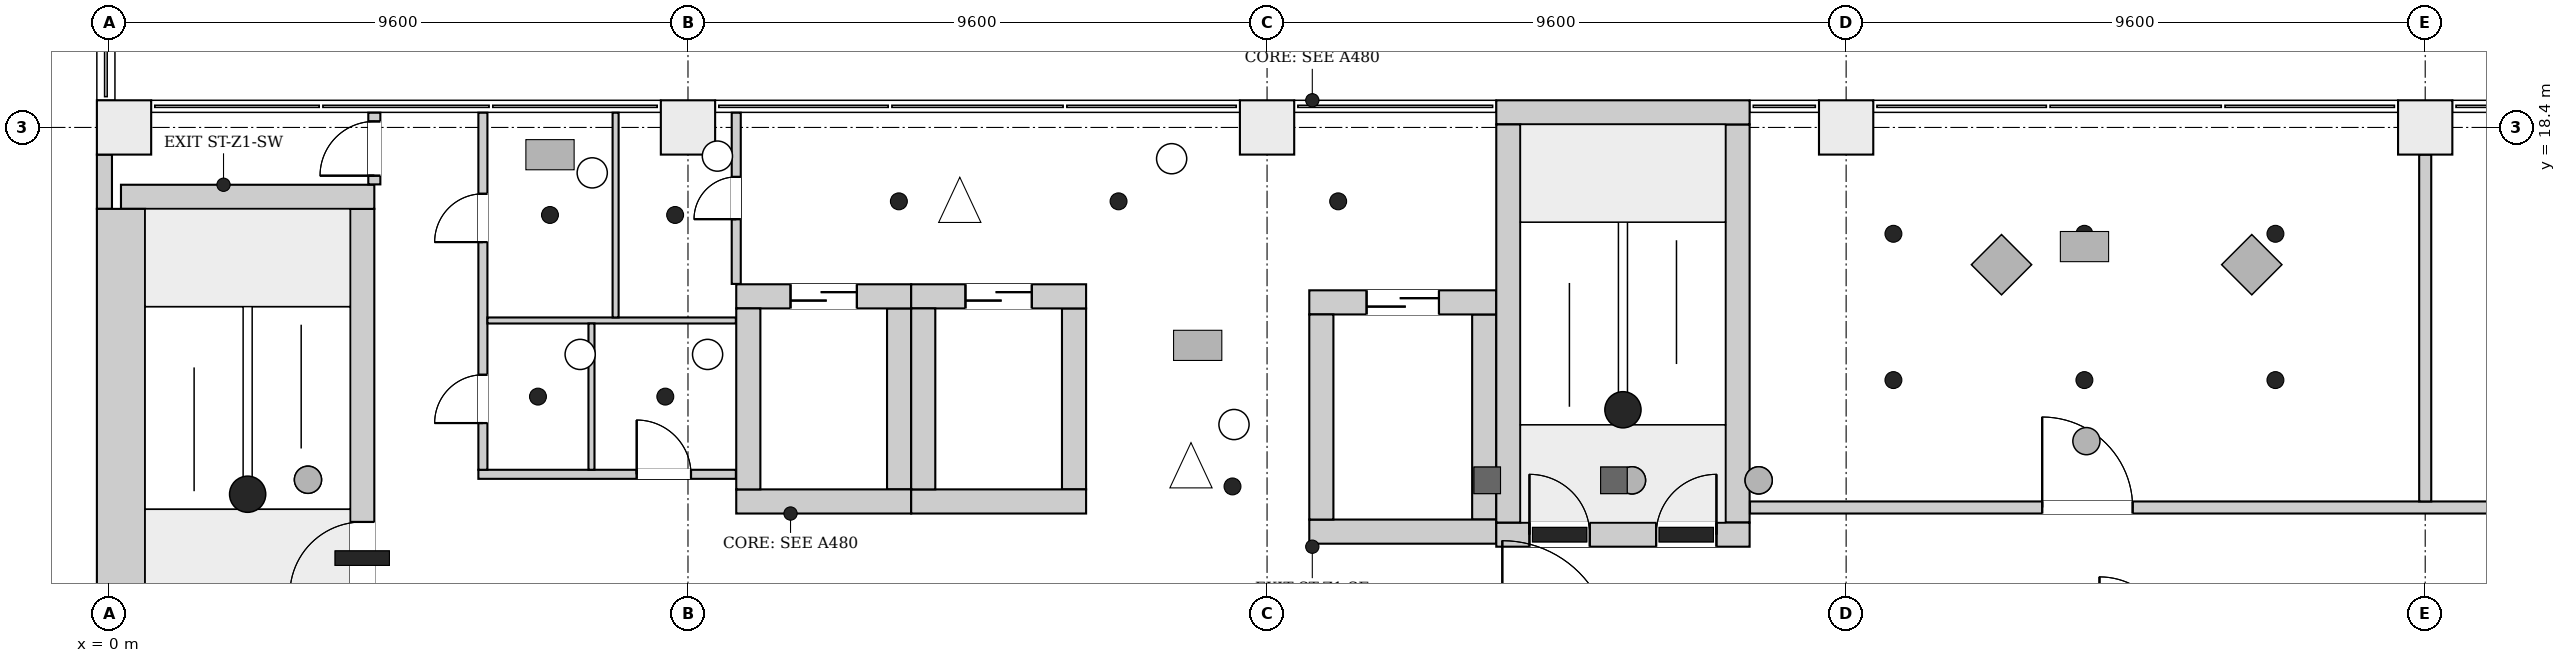
"""IFC4 building model, lengths in metres.
Left out: names, types, materials, properties, quantities, classifications, styles, units other than length and angle.
Written with IfcOpenShell. Run it as: python <this file> out.ifc"""

import sys

from ifc_helpers import new_model, si_unit, direction, frame, frame_2d, origin, origin_2d, place, context, subcontext, project, spatial, rectangle, extrude, element, fill, save


model = new_model("IFC4")
c1 = context("Model", 3, precision=1e-05, world=origin(), true_north=direction((0.0, 1.0)))
c2 = subcontext(c1, "Body", "Model", "MODEL_VIEW")
j1 = project(units=[si_unit("LENGTHUNIT", "METRE"), si_unit("PLANEANGLEUNIT", "RADIAN")], contexts=[c1])
p1 = place(None, origin())
s1 = spatial("IfcSite", under=j1, at=p1, CompositionType="ELEMENT")
p2 = place(p1, origin())
s2 = spatial("IfcBuilding", under=s1, at=p2, CompositionType="ELEMENT")
p3 = place(p2, frame((0.0, 0.0, 61.3)))
s3 = spatial("IfcBuildingStorey", under=s2, at=p3, CompositionType="ELEMENT", Elevation=61.3)
p4 = place(p3, frame((0.2, 17.25, 0.0), z_axis=(0.0, 0.0, 1.0), x_axis=(1.0, 0.0, 0.0)))
e1 = element("IfcWall", 1, at=p4, inside=s3, PredefinedType="SHEAR", context=c2, shape_type="SweptSolid", body=[
    extrude(rectangle(XDim=4.2, YDim=0.4, at=frame_2d((2.1, 0.0))), origin(), (0.0, 0.0, 1.0), 4.2),
])
p5 = place(p3, frame((0.2, 10.45, 0.0), z_axis=(0.0, 0.0, 1.0), x_axis=(0.0, 1.0, 0.0)))
e2 = element("IfcWall", 2, at=p5, inside=s3, PredefinedType="SHEAR", context=c2, shape_type="SweptSolid", body=[
    extrude(rectangle(XDim=6.6, YDim=0.8, at=frame_2d((3.3, 0.0))), origin(), (0.0, 0.0, 1.0), 4.2),
])
p6 = place(p3, frame((4.2, 10.45, 0.0), z_axis=(0.0, 0.0, 1.0), x_axis=(0.0, 1.0, 0.0)))
e3 = element("IfcWall", 3, at=p6, inside=s3, PredefinedType="SHEAR", context=c2, shape_type="SweptSolid", body=[
    extrude(rectangle(XDim=6.6, YDim=0.4, at=frame_2d((3.3, 0.0))), origin(), (0.0, 0.0, 1.0), 4.2),
])
p7 = place(p6, frame((0.21, 0.0, 0.0)))
e4 = element("IfcOpeningElement", 4, at=p7, cuts=e3, PredefinedType="OPENING", context=c2, shape_type="SweptSolid", body=[
    extrude(rectangle(XDim=1.2, YDim=2.1, at=frame_2d((0.6, 1.05))), frame((0.0, 0.21, 0.0), z_axis=(0.0, -1.0, 0.0), x_axis=(1.0, 0.0, 0.0)), (0.0, 0.0, 1.0), 0.42),
])
p8 = place(p3, frame((23.0, 11.65, 0.0), z_axis=(0.0, 0.0, 1.0), x_axis=(1.0, 0.0, 0.0)))
e5 = element("IfcWall", 5, at=p8, inside=s3, PredefinedType="SHEAR", context=c2, shape_type="SweptSolid", body=[
    extrude(rectangle(XDim=4.2, YDim=0.4, at=frame_2d((2.1, 0.0))), origin(), (0.0, 0.0, 1.0), 4.2),
])
p9 = place(p8, frame((0.55, 0.0, 0.0)))
e6 = element("IfcOpeningElement", 6, at=p9, cuts=e5, PredefinedType="OPENING", context=c2, shape_type="SweptSolid", body=[
    extrude(rectangle(XDim=1.0, YDim=2.1, at=frame_2d((0.5, 1.05))), frame((0.0, 0.21, 0.0), z_axis=(0.0, -1.0, 0.0), x_axis=(1.0, 0.0, 0.0)), (0.0, 0.0, 1.0), 0.42),
])
p10 = place(p8, frame((2.65, 0.0, 0.0)))
e7 = element("IfcOpeningElement", 7, at=p10, cuts=e5, PredefinedType="OPENING", context=c2, shape_type="SweptSolid", body=[
    extrude(rectangle(XDim=1.0, YDim=2.1, at=frame_2d((0.5, 1.05))), frame((0.0, 0.21, 0.0), z_axis=(0.0, -1.0, 0.0), x_axis=(1.0, 0.0, 0.0)), (0.0, 0.0, 1.0), 0.42),
])
p11 = place(p3, frame((23.0, 18.65, 0.0), z_axis=(0.0, 0.0, 1.0), x_axis=(1.0, 0.0, 0.0)))
e8 = element("IfcWall", 8, at=p11, inside=s3, PredefinedType="SHEAR", context=c2, shape_type="SweptSolid", body=[
    extrude(rectangle(XDim=4.2, YDim=0.4, at=frame_2d((2.1, 0.0))), origin(), (0.0, 0.0, 1.0), 4.2),
])
for number, where, z_axis, x_axis in (
    (9, (23.2, 11.85, 0.0), (0.0, 0.0, 1.0), (0.0, 1.0, 0.0)),
    (10, (27.0, 11.85, 0.0), (0.0, 0.0, 1.0), (0.0, 1.0, 0.0)),
):
    element("IfcWall", number, at=place(p3, frame(where, z_axis=z_axis, x_axis=x_axis)), inside=s3, PredefinedType="SHEAR", context=c2, shape_type="SweptSolid", body=[
        extrude(rectangle(XDim=6.6, YDim=0.4, at=frame_2d((3.3, 0.0))), origin(), (0.0, 0.0, 1.0), 4.2),
    ])
p12 = place(p3, frame((10.4, 12.2, 0.0), z_axis=(0.0, 0.0, 1.0), x_axis=(1.0, 0.0, 0.0)))
e11 = element("IfcWall", 11, at=p12, inside=s3, PredefinedType="SHEAR", context=c2, shape_type="SweptSolid", body=[
    extrude(rectangle(XDim=2.9, YDim=0.4, at=frame_2d((1.45, 0.0))), origin(), (0.0, 0.0, 1.0), 4.2),
])
p13 = place(p3, frame((10.4, 15.6, 0.0), z_axis=(0.0, 0.0, 1.0), x_axis=(1.0, 0.0, 0.0)))
e12 = element("IfcWall", 12, at=p13, inside=s3, PredefinedType="SHEAR", context=c2, shape_type="SweptSolid", body=[
    extrude(rectangle(XDim=2.9, YDim=0.4, at=frame_2d((1.45, 0.0))), origin(), (0.0, 0.0, 1.0), 4.2),
])
p14 = place(p13, frame((0.9, 0.0, 0.0)))
e13 = element("IfcOpeningElement", 13, at=p14, cuts=e12, PredefinedType="OPENING", context=c2, shape_type="SweptSolid", body=[
    extrude(rectangle(XDim=1.1, YDim=2.1, at=frame_2d((0.55, 1.05))), frame((0.0, 0.21, 0.0), z_axis=(0.0, -1.0, 0.0), x_axis=(1.0, 0.0, 0.0)), (0.0, 0.0, 1.0), 0.42),
])
for number, where, z_axis, x_axis in (
    (14, (10.6, 12.4, 0.0), (0.0, 0.0, 1.0), (0.0, 1.0, 0.0)),
    (15, (13.1, 12.4, 0.0), (0.0, 0.0, 1.0), (0.0, 1.0, 0.0)),
):
    element("IfcWall", number, at=place(p3, frame(where, z_axis=z_axis, x_axis=x_axis)), inside=s3, PredefinedType="SHEAR", context=c2, shape_type="SweptSolid", body=[
        extrude(rectangle(XDim=3.0, YDim=0.4, at=frame_2d((1.5, 0.0))), origin(), (0.0, 0.0, 1.0), 4.2),
    ])
p15 = place(p3, frame((13.3, 12.2, 0.0), z_axis=(0.0, 0.0, 1.0), x_axis=(1.0, 0.0, 0.0)))
e16 = element("IfcWall", 16, at=p15, inside=s3, PredefinedType="SHEAR", context=c2, shape_type="SweptSolid", body=[
    extrude(rectangle(XDim=2.9, YDim=0.4, at=frame_2d((1.45, 0.0))), origin(), (0.0, 0.0, 1.0), 4.2),
])
p16 = place(p3, frame((13.3, 15.6, 0.0), z_axis=(0.0, 0.0, 1.0), x_axis=(1.0, 0.0, 0.0)))
e17 = element("IfcWall", 17, at=p16, inside=s3, PredefinedType="SHEAR", context=c2, shape_type="SweptSolid", body=[
    extrude(rectangle(XDim=2.9, YDim=0.4, at=frame_2d((1.45, 0.0))), origin(), (0.0, 0.0, 1.0), 4.2),
])
p17 = place(p16, frame((0.9, 0.0, 0.0)))
e18 = element("IfcOpeningElement", 18, at=p17, cuts=e17, PredefinedType="OPENING", context=c2, shape_type="SweptSolid", body=[
    extrude(rectangle(XDim=1.1, YDim=2.1, at=frame_2d((0.55, 1.05))), frame((0.0, 0.21, 0.0), z_axis=(0.0, -1.0, 0.0), x_axis=(1.0, 0.0, 0.0)), (0.0, 0.0, 1.0), 0.42),
])
for number, where, z_axis, x_axis in (
    (19, (13.5, 12.4, 0.0), (0.0, 0.0, 1.0), (0.0, 1.0, 0.0)),
    (20, (16.0, 12.4, 0.0), (0.0, 0.0, 1.0), (0.0, 1.0, 0.0)),
):
    element("IfcWall", number, at=place(p3, frame(where, z_axis=z_axis, x_axis=x_axis)), inside=s3, PredefinedType="SHEAR", context=c2, shape_type="SweptSolid", body=[
        extrude(rectangle(XDim=3.0, YDim=0.4, at=frame_2d((1.5, 0.0))), origin(), (0.0, 0.0, 1.0), 4.2),
    ])
p18 = place(p3, frame((19.9, 11.7, 0.0), z_axis=(0.0, 0.0, 1.0), x_axis=(1.0, 0.0, 0.0)))
e21 = element("IfcWall", 21, at=p18, inside=s3, PredefinedType="SHEAR", context=c2, shape_type="SweptSolid", body=[
    extrude(rectangle(XDim=3.1, YDim=0.4, at=frame_2d((1.55, 0.0))), origin(), (0.0, 0.0, 1.0), 4.2),
])
p19 = place(p3, frame((19.9, 15.5, 0.0), z_axis=(0.0, 0.0, 1.0), x_axis=(1.0, 0.0, 0.0)))
e22 = element("IfcWall", 22, at=p19, inside=s3, PredefinedType="SHEAR", context=c2, shape_type="SweptSolid", body=[
    extrude(rectangle(XDim=3.1, YDim=0.4, at=frame_2d((1.55, 0.0))), origin(), (0.0, 0.0, 1.0), 4.2),
])
p20 = place(p19, frame((0.95, 0.0, 0.0)))
e23 = element("IfcOpeningElement", 23, at=p20, cuts=e22, PredefinedType="OPENING", context=c2, shape_type="SweptSolid", body=[
    extrude(rectangle(XDim=1.2, YDim=2.1, at=frame_2d((0.6, 1.05))), frame((0.0, 0.21, 0.0), z_axis=(0.0, -1.0, 0.0), x_axis=(1.0, 0.0, 0.0)), (0.0, 0.0, 1.0), 0.42),
])
for number, where, z_axis, x_axis in (
    (24, (20.1, 11.9, 0.0), (0.0, 0.0, 1.0), (0.0, 1.0, 0.0)),
    (25, (22.8, 11.9, 0.0), (0.0, 0.0, 1.0), (0.0, 1.0, 0.0)),
):
    element("IfcWall", number, at=place(p3, frame(where, z_axis=z_axis, x_axis=x_axis)), inside=s3, PredefinedType="SHEAR", context=c2, shape_type="SweptSolid", body=[
        extrude(rectangle(XDim=3.4, YDim=0.4, at=frame_2d((1.7, 0.0))), origin(), (0.0, 0.0, 1.0), 4.2),
    ])
for number, where, z_axis, x_axis in (
    (26, (0.25, 18.4, 0.0), (0.0, 0.0, 1.0), (1.0, 0.0, 0.0)),
    (27, (9.6, 18.4, 0.0), (0.0, 0.0, 1.0), (1.0, 0.0, 0.0)),
    (28, (19.2, 18.4, 0.0), (0.0, 0.0, 1.0), (1.0, 0.0, 0.0)),
    (29, (28.8, 18.4, 0.0), (0.0, 0.0, 1.0), (1.0, 0.0, 0.0)),
    (30, (38.4, 18.4, 0.0), (0.0, 0.0, 1.0), (1.0, 0.0, 0.0)),
):
    element("IfcColumn", number, at=place(p3, frame(where, z_axis=z_axis, x_axis=x_axis)), inside=s3, PredefinedType="COLUMN", context=c2, shape_type="SweptSolid", body=[
        extrude(rectangle(XDim=0.9, YDim=0.9, at=origin_2d()), origin(), (0.0, 0.0, 1.0), 4.2),
    ])
p21 = place(p3, frame((-0.074, 17.95, 0.0), z_axis=(0.0, 0.0, 1.0), x_axis=(0.0, -1.0, 0.0)))
e31 = element("IfcWall", 31, at=p21, inside=s3, PredefinedType="ELEMENTEDWALL", context=c2, shape_type="SweptSolid", body=[
    extrude(rectangle(XDim=0.9, YDim=0.25, at=frame_2d((0.45, 0.0))), origin(), (0.0, 0.0, 1.0), 3.9),
])
p22 = place(p3, frame((4.4, 17.456, 0.0), z_axis=(0.0, 0.0, 1.0), x_axis=(0.0, 1.0, 0.0)))
e32 = element("IfcWall", 32, at=p22, inside=s3, PredefinedType="PARTITIONING", context=c2, shape_type="SweptSolid", body=[
    extrude(rectangle(XDim=1.188, YDim=0.2, at=frame_2d((0.594, 0.0))), origin(), (0.0, 0.0, 1.0), 3.9),
])
p23 = place(p22, frame((0.144, 0.0, 0.0)))
e33 = element("IfcOpeningElement", 33, at=p23, cuts=e32, PredefinedType="OPENING", context=c2, shape_type="SweptSolid", body=[
    extrude(rectangle(XDim=0.9, YDim=2.1, at=frame_2d((0.45, 1.05))), frame((0.0, 0.11, 0.0), z_axis=(0.0, -1.0, 0.0), x_axis=(1.0, 0.0, 0.0)), (0.0, 0.0, 1.0), 0.22),
])
p24 = place(p3, frame((6.125, 12.65, 0.0), z_axis=(0.0, 0.0, 1.0), x_axis=(1.0, 0.0, 0.0)))
e34 = element("IfcWall", 34, at=p24, inside=s3, PredefinedType="PARTITIONING", context=c2, shape_type="SweptSolid", body=[
    extrude(rectangle(XDim=4.269, YDim=0.15, at=frame_2d((2.135, 0.0))), origin(), (0.0, 0.0, 1.0), 3.9),
])
p25 = place(p24, frame((2.625, 0.0, 0.0)))
e35 = element("IfcOpeningElement", 35, at=p25, cuts=e34, PredefinedType="OPENING", context=c2, shape_type="SweptSolid", body=[
    extrude(rectangle(XDim=0.9, YDim=2.1, at=frame_2d((0.45, 1.05))), frame((0.0, 0.085, 0.0), z_axis=(0.0, -1.0, 0.0), x_axis=(1.0, 0.0, 0.0)), (0.0, 0.0, 1.0), 0.17),
])
p26 = place(p3, frame((6.2, 12.725, 0.0), z_axis=(0.0, 0.0, 1.0), x_axis=(0.0, 1.0, 0.0)))
e36 = element("IfcWall", 36, at=p26, inside=s3, PredefinedType="PARTITIONING", context=c2, shape_type="SweptSolid", body=[
    extrude(rectangle(XDim=5.919, YDim=0.15, at=frame_2d((2.959, 0.0))), origin(), (0.0, 0.0, 1.0), 3.9),
])
p27 = place(p26, frame((0.775, 0.0, 0.0)))
e37 = element("IfcOpeningElement", 37, at=p27, cuts=e36, PredefinedType="OPENING", context=c2, shape_type="SweptSolid", body=[
    extrude(rectangle(XDim=0.8, YDim=2.1, at=frame_2d((0.4, 1.05))), frame((0.0, 0.085, 0.0), z_axis=(0.0, -1.0, 0.0), x_axis=(1.0, 0.0, 0.0)), (0.0, 0.0, 1.0), 0.17),
])
p28 = place(p26, frame((3.775, 0.0, 0.0)))
e38 = element("IfcOpeningElement", 38, at=p28, cuts=e36, PredefinedType="OPENING", context=c2, shape_type="SweptSolid", body=[
    extrude(rectangle(XDim=0.8, YDim=2.1, at=frame_2d((0.4, 1.05))), frame((0.0, 0.085, 0.0), z_axis=(0.0, -1.0, 0.0), x_axis=(1.0, 0.0, 0.0)), (0.0, 0.0, 1.0), 0.17),
])
p29 = place(p3, frame((6.275, 15.2, 0.0), z_axis=(0.0, 0.0, 1.0), x_axis=(1.0, 0.0, 0.0)))
e39 = element("IfcWall", 39, at=p29, inside=s3, PredefinedType="PARTITIONING", context=c2, shape_type="SweptSolid", body=[
    extrude(rectangle(XDim=4.119, YDim=0.1, at=frame_2d((2.06, 0.0))), origin(), (0.0, 0.0, 1.0), 3.9),
])
p30 = place(p3, frame((8.0, 12.725, 0.0), z_axis=(0.0, 0.0, 1.0), x_axis=(0.0, 1.0, 0.0)))
e40 = element("IfcWall", 40, at=p30, inside=s3, PredefinedType="PARTITIONING", context=c2, shape_type="SweptSolid", body=[
    extrude(rectangle(XDim=2.425, YDim=0.1, at=frame_2d((1.212, 0.0))), origin(), (0.0, 0.0, 1.0), 3.9),
])
p31 = place(p3, frame((8.4, 15.25, 0.0), z_axis=(0.0, 0.0, 1.0), x_axis=(0.0, 1.0, 0.0)))
e41 = element("IfcWall", 41, at=p31, inside=s3, PredefinedType="PARTITIONING", context=c2, shape_type="SweptSolid", body=[
    extrude(rectangle(XDim=3.394, YDim=0.1, at=frame_2d((1.697, 0.0))), origin(), (0.0, 0.0, 1.0), 3.9),
])
p32 = place(p3, frame((10.4, 15.806, 0.0), z_axis=(0.0, 0.0, 1.0), x_axis=(0.0, 1.0, 0.0)))
e42 = element("IfcWall", 42, at=p32, inside=s3, PredefinedType="PARTITIONING", context=c2, shape_type="SweptSolid", body=[
    extrude(rectangle(XDim=2.838, YDim=0.15, at=frame_2d((1.419, 0.0))), origin(), (0.0, 0.0, 1.0), 3.9),
])
p33 = place(p32, frame((1.074, 0.0, 0.0)))
e43 = element("IfcOpeningElement", 43, at=p33, cuts=e42, PredefinedType="OPENING", context=c2, shape_type="SweptSolid", body=[
    extrude(rectangle(XDim=0.7, YDim=2.1, at=frame_2d((0.35, 1.05))), frame((0.0, 0.085, 0.0), z_axis=(0.0, -1.0, 0.0), x_axis=(1.0, 0.0, 0.0)), (0.0, 0.0, 1.0), 0.17),
])
p34 = place(p3, frame((27.206, 12.1, 0.0), z_axis=(0.0, 0.0, 1.0), x_axis=(1.0, 0.0, 0.0)))
e44 = element("IfcWall", 44, at=p34, inside=s3, PredefinedType="PARTITIONING", context=c2, shape_type="SweptSolid", body=[
    extrude(rectangle(XDim=20.988, YDim=0.2, at=frame_2d((10.494, 0.0))), origin(), (0.0, 0.0, 1.0), 3.9),
])
p35 = place(p34, frame((4.844, 0.0, 0.0)))
e45 = element("IfcOpeningElement", 45, at=p35, cuts=e44, PredefinedType="OPENING", context=c2, shape_type="SweptSolid", body=[
    extrude(rectangle(XDim=1.5, YDim=2.1, at=frame_2d((0.75, 1.05))), frame((0.0, 0.11, 0.0), z_axis=(0.0, -1.0, 0.0), x_axis=(1.0, 0.0, 0.0)), (0.0, 0.0, 1.0), 0.22),
])
p36 = place(p34, frame((15.494, 0.0, 0.0)))
e46 = element("IfcOpeningElement", 46, at=p36, cuts=e44, PredefinedType="OPENING", context=c2, shape_type="SweptSolid", body=[
    extrude(rectangle(XDim=1.2, YDim=2.1, at=frame_2d((0.6, 1.05))), frame((0.0, 0.11, 0.0), z_axis=(0.0, -1.0, 0.0), x_axis=(1.0, 0.0, 0.0)), (0.0, 0.0, 1.0), 0.22),
])
p37 = place(p3, frame((38.4, 12.2, 0.0), z_axis=(0.0, 0.0, 1.0), x_axis=(0.0, 1.0, 0.0)))
e47 = element("IfcWall", 47, at=p37, inside=s3, PredefinedType="PARTITIONING", context=c2, shape_type="SweptSolid", body=[
    extrude(rectangle(XDim=5.75, YDim=0.2, at=frame_2d((2.875, 0.0))), origin(), (0.0, 0.0, 1.0), 3.9),
])
p38 = place(p7, origin())
e48 = element("IfcDoor", 48, at=p38, inside=s3, OperationType="SINGLE_SWING_RIGHT", PredefinedType="DOOR", context=c2, shape_type="SweptSolid", body=[
    extrude(rectangle(XDim=1.2, YDim=2.1, at=frame_2d((0.6, 1.05))), frame((0.0, 0.025, 0.0), z_axis=(0.0, -1.0, 0.0), x_axis=(1.0, 0.0, 0.0)), (0.0, 0.0, 1.0), 0.05),
])
fill(e4, e48)
p39 = place(p9, origin())
e49 = element("IfcDoor", 49, at=p39, inside=s3, OperationType="SINGLE_SWING_RIGHT", PredefinedType="DOOR", context=c2, shape_type="SweptSolid", body=[
    extrude(rectangle(XDim=1.0, YDim=2.1, at=frame_2d((0.5, 1.05))), frame((0.0, 0.025, 0.0), z_axis=(0.0, -1.0, 0.0), x_axis=(1.0, 0.0, 0.0)), (0.0, 0.0, 1.0), 0.05),
])
fill(e6, e49)
p40 = place(p10, origin())
e50 = element("IfcDoor", 50, at=p40, inside=s3, OperationType="SINGLE_SWING_LEFT", PredefinedType="DOOR", context=c2, shape_type="SweptSolid", body=[
    extrude(rectangle(XDim=1.0, YDim=2.1, at=frame_2d((0.5, 1.05))), frame((0.0, 0.025, 0.0), z_axis=(0.0, -1.0, 0.0), x_axis=(1.0, 0.0, 0.0)), (0.0, 0.0, 1.0), 0.05),
])
fill(e7, e50)
p41 = place(p14, origin())
e51 = element("IfcDoor", 51, at=p41, inside=s3, OperationType="DOUBLE_DOOR_SLIDING", PredefinedType="DOOR", context=c2, shape_type="SweptSolid", body=[
    extrude(rectangle(XDim=1.1, YDim=2.1, at=frame_2d((0.55, 1.05))), frame((0.0, 0.025, 0.0), z_axis=(0.0, -1.0, 0.0), x_axis=(1.0, 0.0, 0.0)), (0.0, 0.0, 1.0), 0.05),
])
fill(e13, e51)
p42 = place(p17, origin())
e52 = element("IfcDoor", 52, at=p42, inside=s3, OperationType="DOUBLE_DOOR_SLIDING", PredefinedType="DOOR", context=c2, shape_type="SweptSolid", body=[
    extrude(rectangle(XDim=1.1, YDim=2.1, at=frame_2d((0.55, 1.05))), frame((0.0, 0.025, 0.0), z_axis=(0.0, -1.0, 0.0), x_axis=(1.0, 0.0, 0.0)), (0.0, 0.0, 1.0), 0.05),
])
fill(e18, e52)
p43 = place(p20, origin())
e53 = element("IfcDoor", 53, at=p43, inside=s3, OperationType="DOUBLE_DOOR_SLIDING", PredefinedType="DOOR", context=c2, shape_type="SweptSolid", body=[
    extrude(rectangle(XDim=1.2, YDim=2.1, at=frame_2d((0.6, 1.05))), frame((0.0, 0.025, 0.0), z_axis=(0.0, -1.0, 0.0), x_axis=(1.0, 0.0, 0.0)), (0.0, 0.0, 1.0), 0.05),
])
fill(e23, e53)
p44 = place(p23, origin())
e54 = element("IfcDoor", 54, at=p44, inside=s3, OperationType="SINGLE_SWING_LEFT", PredefinedType="DOOR", context=c2, shape_type="SweptSolid", body=[
    extrude(rectangle(XDim=0.9, YDim=2.1, at=frame_2d((0.45, 1.05))), frame((0.0, 0.025, 0.0), z_axis=(0.0, -1.0, 0.0), x_axis=(1.0, 0.0, 0.0)), (0.0, 0.0, 1.0), 0.05),
])
fill(e33, e54)
p45 = place(p27, origin())
e55 = element("IfcDoor", 55, at=p45, inside=s3, OperationType="SINGLE_SWING_LEFT", PredefinedType="DOOR", context=c2, shape_type="SweptSolid", body=[
    extrude(rectangle(XDim=0.8, YDim=2.1, at=frame_2d((0.4, 1.05))), frame((0.0, 0.025, 0.0), z_axis=(0.0, -1.0, 0.0), x_axis=(1.0, 0.0, 0.0)), (0.0, 0.0, 1.0), 0.05),
])
fill(e37, e55)
p46 = place(p25, origin())
e56 = element("IfcDoor", 56, at=p46, inside=s3, OperationType="SINGLE_SWING_RIGHT", PredefinedType="DOOR", context=c2, shape_type="SweptSolid", body=[
    extrude(rectangle(XDim=0.9, YDim=2.1, at=frame_2d((0.45, 1.05))), frame((0.0, 0.025, 0.0), z_axis=(0.0, -1.0, 0.0), x_axis=(1.0, 0.0, 0.0)), (0.0, 0.0, 1.0), 0.05),
])
fill(e35, e56)
p47 = place(p28, origin())
e57 = element("IfcDoor", 57, at=p47, inside=s3, OperationType="SINGLE_SWING_LEFT", PredefinedType="DOOR", context=c2, shape_type="SweptSolid", body=[
    extrude(rectangle(XDim=0.8, YDim=2.1, at=frame_2d((0.4, 1.05))), frame((0.0, 0.025, 0.0), z_axis=(0.0, -1.0, 0.0), x_axis=(1.0, 0.0, 0.0)), (0.0, 0.0, 1.0), 0.05),
])
fill(e38, e57)
p48 = place(p33, origin())
e58 = element("IfcDoor", 58, at=p48, inside=s3, OperationType="SINGLE_SWING_LEFT", PredefinedType="DOOR", context=c2, shape_type="SweptSolid", body=[
    extrude(rectangle(XDim=0.7, YDim=2.1, at=frame_2d((0.35, 1.05))), frame((0.0, 0.025, 0.0), z_axis=(0.0, -1.0, 0.0), x_axis=(1.0, 0.0, 0.0)), (0.0, 0.0, 1.0), 0.05),
])
fill(e43, e58)
p49 = place(p35, origin())
e59 = element("IfcDoor", 59, at=p49, inside=s3, OperationType="DOUBLE_DOOR_SINGLE_SWING", PredefinedType="DOOR", context=c2, shape_type="SweptSolid", body=[
    extrude(rectangle(XDim=1.5, YDim=2.1, at=frame_2d((0.75, 1.05))), frame((0.0, 0.025, 0.0), z_axis=(0.0, -1.0, 0.0), x_axis=(1.0, 0.0, 0.0)), (0.0, 0.0, 1.0), 0.05),
])
fill(e45, e59)
save(model, sys.argv[1])
